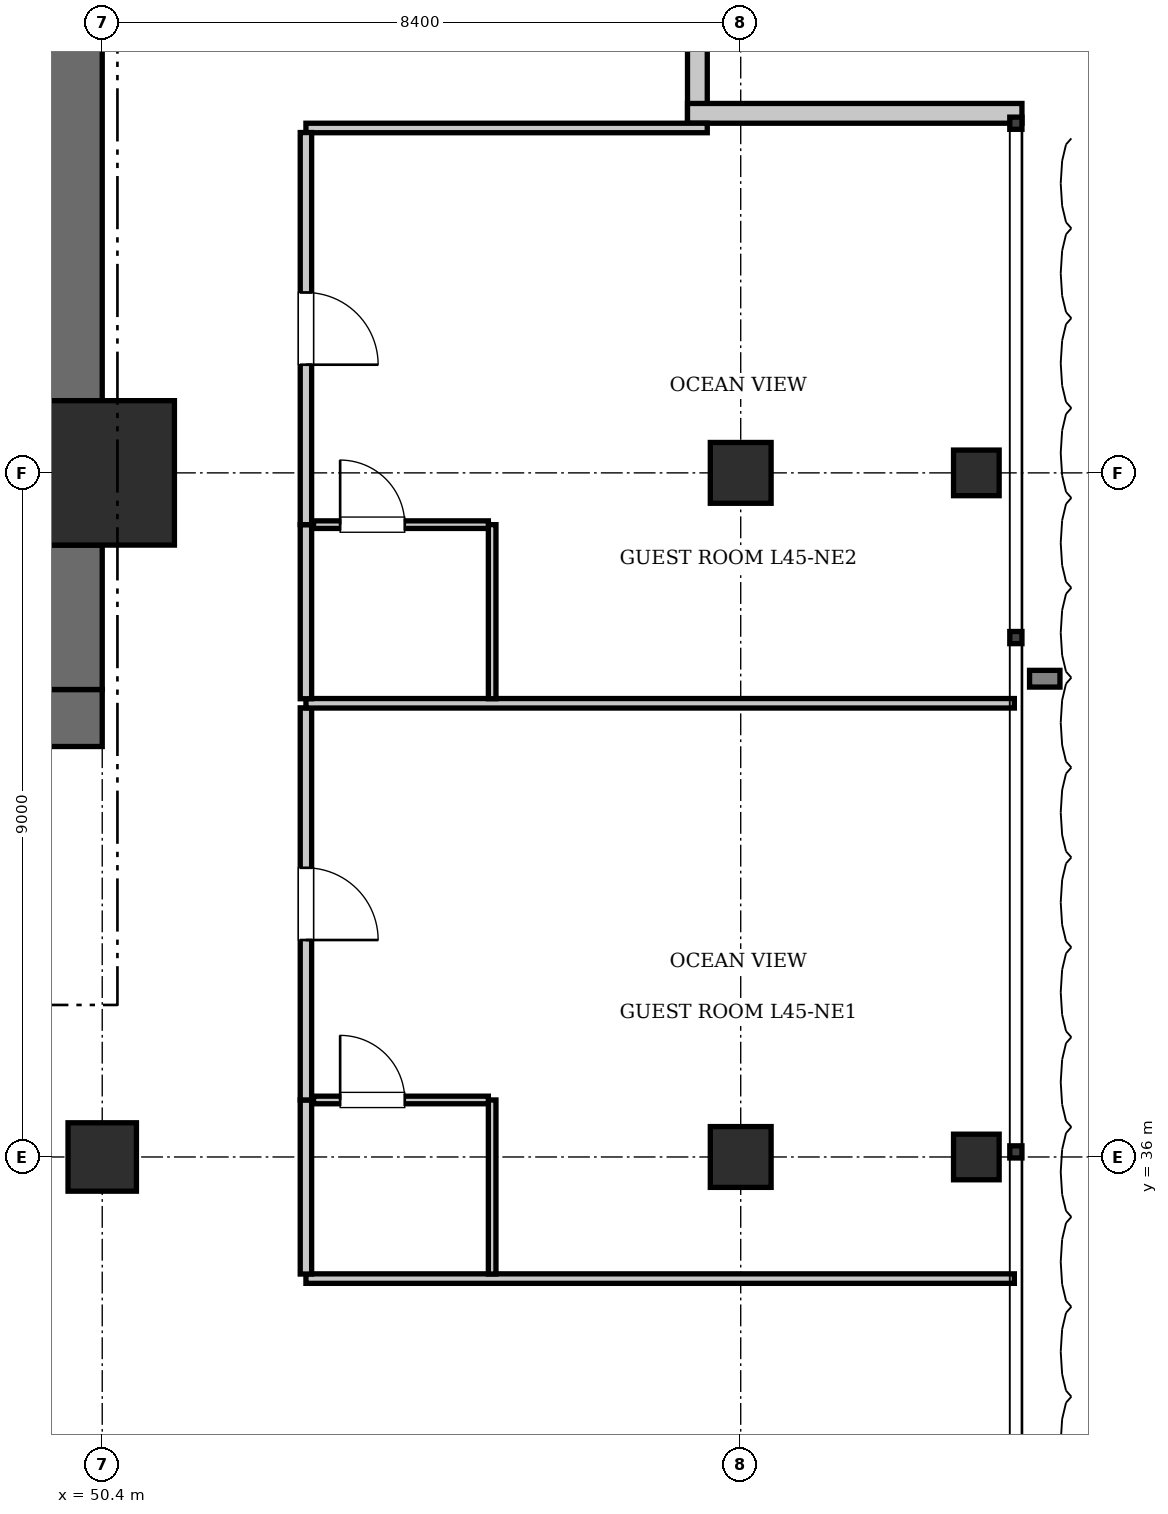
"""IFC4 building model, lengths in metres.
Left out: names, types, materials, properties, quantities, classifications, styles, units other than length and angle.
Written with IfcOpenShell. Run it as: python <this file> out.ifc"""

import sys

from ifc_helpers import new_model, si_unit, direction, frame, frame_2d, origin, origin_2d, place, context, subcontext, project, spatial, rectangle, i_section, extrude, element, fill, save


model = new_model("IFC4")
c1 = context("Model", 3, precision=1e-05, world=origin(), true_north=direction((0.0, 1.0)))
c2 = subcontext(c1, "Body", "Model", "MODEL_VIEW")
j1 = project(units=[si_unit("LENGTHUNIT", "METRE"), si_unit("PLANEANGLEUNIT", "RADIAN")], contexts=[c1])
p1 = place(None, origin())
s1 = spatial("IfcSite", under=j1, at=p1, CompositionType="ELEMENT")
p2 = place(p1, origin())
s2 = spatial("IfcBuilding", under=s1, at=p2, CompositionType="ELEMENT")
p3 = place(p2, frame((0.0, 0.0, 185.15)))
s3 = spatial("IfcBuildingStorey", under=s2, at=p3, CompositionType="ELEMENT", Elevation=185.15)
p4 = place(p3, frame((50.4, 45.0, 0.0), z_axis=(0.0, 0.0, 1.0), x_axis=(1.0, 0.0, 0.0)))
e1 = element("IfcColumn", 1, at=p4, inside=s3, PredefinedType="COLUMN", context=c2, shape_type="SweptSolid", body=[
    extrude(rectangle(XDim=1.9, YDim=1.9, at=origin_2d()), origin(), (0.0, 0.0, 1.0), 3.85),
])
p5 = place(p3, frame((43.6, 41.775, 0.0), z_axis=(0.0, 0.0, 1.0), x_axis=(1.0, 0.0, 0.0)))
e2 = element("IfcWall", 2, at=p5, inside=s3, PredefinedType="SHEAR", context=c2, shape_type="SweptSolid", body=[
    extrude(rectangle(XDim=6.8, YDim=0.75, at=frame_2d((3.4, 0.0))), origin(), (0.0, 0.0, 1.0), 3.85),
])
p6 = place(p5, frame((3.9, 0.0, 0.0)))
e3 = element("IfcOpeningElement", 3, at=p6, cuts=e2, PredefinedType="OPENING", context=c2, shape_type="SweptSolid", body=[
    extrude(rectangle(XDim=1.15, YDim=2.15, at=frame_2d((0.575, 1.075))), frame((0.0, 0.385, 0.0), z_axis=(0.0, -1.0, 0.0), x_axis=(1.0, 0.0, 0.0)), (0.0, 0.0, 1.0), 0.77),
])
p7 = place(p5, frame((0.55, 0.0, 0.0)))
e4 = element("IfcOpeningElement", 4, at=p7, cuts=e2, PredefinedType="OPENING", context=c2, shape_type="SweptSolid", body=[
    extrude(rectangle(XDim=1.1, YDim=2.2, at=frame_2d((0.55, 1.1))), frame((0.0, 0.385, 0.0), z_axis=(0.0, -1.0, 0.0), x_axis=(1.0, 0.0, 0.0)), (0.0, 0.0, 1.0), 0.77),
])
p8 = place(p3, frame((50.025, 42.15, 0.0), z_axis=(0.0, 0.0, 1.0), x_axis=(0.0, 1.0, 0.0)))
e5 = element("IfcWall", 5, at=p8, inside=s3, PredefinedType="SHEAR", context=c2, shape_type="SweptSolid", body=[
    extrude(rectangle(XDim=1.9, YDim=0.75, at=frame_2d((0.95, 0.0))), origin(), (0.0, 0.0, 1.0), 3.85),
])
p9 = place(p3, frame((50.025, 45.95, 0.0), z_axis=(0.0, 0.0, 1.0), x_axis=(0.0, 1.0, 0.0)))
e6 = element("IfcWall", 6, at=p9, inside=s3, PredefinedType="SHEAR", context=c2, shape_type="SweptSolid", body=[
    extrude(rectangle(XDim=7.3, YDim=0.75, at=frame_2d((3.65, 0.0))), origin(), (0.0, 0.0, 1.0), 3.85),
])
p10 = place(p3, frame((50.4, 36.0, 0.0), z_axis=(0.0, 0.0, 1.0), x_axis=(1.0, 0.0, 0.0)))
e7 = element("IfcColumn", 7, at=p10, inside=s3, PredefinedType="COLUMN", context=c2, shape_type="SweptSolid", body=[
    extrude(rectangle(XDim=0.9, YDim=0.9, at=origin_2d()), origin(), (0.0, 0.0, 1.0), 3.85),
])
for number, where, z_axis, x_axis in (
    (8, (58.8, 36.0, 0.0), (0.0, 0.0, 1.0), (1.0, 0.0, 0.0)),
    (9, (58.8, 45.0, 0.0), (0.0, 0.0, 1.0), (1.0, 0.0, 0.0)),
):
    element("IfcColumn", number, at=place(p3, frame(where, z_axis=z_axis, x_axis=x_axis)), inside=s3, PredefinedType="COLUMN", context=c2, shape_type="SweptSolid", body=[
        extrude(rectangle(XDim=0.8, YDim=0.8, at=origin_2d()), origin(), (0.0, 0.0, 1.0), 3.85),
    ])
for number, where, z_axis, x_axis in (
    (10, (61.9, 36.0, 0.0), (0.0, 0.0, 1.0), (1.0, 0.0, 0.0)),
    (11, (61.9, 45.0, 0.0), (0.0, 0.0, 1.0), (1.0, 0.0, 0.0)),
):
    element("IfcColumn", number, at=place(p3, frame(where, z_axis=z_axis, x_axis=x_axis)), inside=s3, PredefinedType="COLUMN", context=c2, shape_type="SweptSolid", body=[
        extrude(i_section(OverallWidth=0.6, OverallDepth=0.6, WebThickness=0.025, FlangeThickness=0.038, at=origin_2d()), origin(), (0.0, 0.0, 1.0), 3.85),
    ])
for number, where, z_axis, x_axis in (
    (12, (58.23, 54.0, 0.0), (0.0, 0.0, 1.0), (0.0, -1.0, 0.0)),
    (13, (58.1, 49.73, 0.0), (0.0, 0.0, 1.0), (1.0, 0.0, 0.0)),
):
    element("IfcWall", number, at=place(p3, frame(where, z_axis=z_axis, x_axis=x_axis)), inside=s3, PredefinedType="SOLIDWALL", context=c2, shape_type="SweptSolid", body=[
        extrude(rectangle(XDim=4.4, YDim=0.26, at=frame_2d((2.2, 0.0))), origin(), (0.0, 0.0, 1.0), 3.61),
    ])
p11 = place(p3, frame((53.08, 34.4, 0.0), z_axis=(0.0, 0.0, 1.0), x_axis=(1.0, 0.0, 0.0)))
e14 = element("IfcWall", 14, at=p11, inside=s3, PredefinedType="PARTITIONING", context=c2, shape_type="SweptSolid", body=[
    extrude(rectangle(XDim=9.32, YDim=0.125, at=frame_2d((4.66, 0.0))), origin(), (0.0, 0.0, 1.0), 3.61),
])
p12 = place(p3, frame((53.08, 49.538, 0.0), z_axis=(0.0, 0.0, 1.0), x_axis=(1.0, 0.0, 0.0)))
e15 = element("IfcWall", 15, at=p12, inside=s3, PredefinedType="PARTITIONING", context=c2, shape_type="SweptSolid", body=[
    extrude(rectangle(XDim=5.28, YDim=0.125, at=frame_2d((2.64, 0.0))), origin(), (0.0, 0.0, 1.0), 3.61),
])
p13 = place(p3, frame((53.08, 34.46, 0.0), z_axis=(0.0, 0.0, 1.0), x_axis=(0.0, 1.0, 0.0)))
e16 = element("IfcWall", 16, at=p13, inside=s3, PredefinedType="PARTITIONING", context=c2, shape_type="SweptSolid", body=[
    extrude(rectangle(XDim=2.29, YDim=0.15, at=frame_2d((1.145, 0.0))), origin(), (0.0, 0.0, 1.0), 3.61),
])
p14 = place(p3, frame((53.08, 36.75, 0.0), z_axis=(0.0, 0.0, 1.0), x_axis=(0.0, 1.0, 0.0)))
e17 = element("IfcWall", 17, at=p14, inside=s3, PredefinedType="PARTITIONING", context=c2, shape_type="SweptSolid", body=[
    extrude(rectangle(XDim=5.159, YDim=0.15, at=frame_2d((2.579, 0.0))), origin(), (0.0, 0.0, 1.0), 3.61),
])
p15 = place(p14, frame((2.104, 0.0, 0.0)))
e18 = element("IfcOpeningElement", 18, at=p15, cuts=e17, PredefinedType="OPENING", context=c2, shape_type="SweptSolid", body=[
    extrude(rectangle(XDim=0.95, YDim=2.15, at=frame_2d((0.475, 1.075))), frame((0.0, 0.085, 0.0), z_axis=(0.0, -1.0, 0.0), x_axis=(1.0, 0.0, 0.0)), (0.0, 0.0, 1.0), 0.17),
])
p16 = place(p3, frame((55.53, 34.46, 0.0), z_axis=(0.0, 0.0, 1.0), x_axis=(0.0, 1.0, 0.0)))
e19 = element("IfcWall", 19, at=p16, inside=s3, PredefinedType="PARTITIONING", context=c2, shape_type="SweptSolid", body=[
    extrude(rectangle(XDim=2.29, YDim=0.1, at=frame_2d((1.145, 0.0))), origin(), (0.0, 0.0, 1.0), 3.61),
])
p17 = place(p3, frame((53.18, 36.75, 0.0), z_axis=(0.0, 0.0, 1.0), x_axis=(1.0, 0.0, 0.0)))
e20 = element("IfcWall", 20, at=p17, inside=s3, PredefinedType="PARTITIONING", context=c2, shape_type="SweptSolid", body=[
    extrude(rectangle(XDim=2.3, YDim=0.1, at=frame_2d((1.15, 0.0))), origin(), (0.0, 0.0, 1.0), 3.61),
])
p18 = place(p17, frame((0.35, 0.0, 0.0)))
e21 = element("IfcOpeningElement", 21, at=p18, cuts=e20, PredefinedType="OPENING", context=c2, shape_type="SweptSolid", body=[
    extrude(rectangle(XDim=0.85, YDim=2.1, at=frame_2d((0.425, 1.05))), frame((0.0, 0.06, 0.0), z_axis=(0.0, -1.0, 0.0), x_axis=(1.0, 0.0, 0.0)), (0.0, 0.0, 1.0), 0.12),
])
p19 = place(p3, frame((53.08, 41.969, 0.0), z_axis=(0.0, 0.0, 1.0), x_axis=(1.0, 0.0, 0.0)))
e22 = element("IfcWall", 22, at=p19, inside=s3, PredefinedType="PARTITIONING", context=c2, shape_type="SweptSolid", body=[
    extrude(rectangle(XDim=9.32, YDim=0.125, at=frame_2d((4.66, 0.0))), origin(), (0.0, 0.0, 1.0), 3.61),
])
p20 = place(p3, frame((53.08, 42.029, 0.0), z_axis=(0.0, 0.0, 1.0), x_axis=(0.0, 1.0, 0.0)))
e23 = element("IfcWall", 23, at=p20, inside=s3, PredefinedType="PARTITIONING", context=c2, shape_type="SweptSolid", body=[
    extrude(rectangle(XDim=2.29, YDim=0.15, at=frame_2d((1.145, 0.0))), origin(), (0.0, 0.0, 1.0), 3.61),
])
p21 = place(p3, frame((53.08, 44.319, 0.0), z_axis=(0.0, 0.0, 1.0), x_axis=(0.0, 1.0, 0.0)))
e24 = element("IfcWall", 24, at=p21, inside=s3, PredefinedType="PARTITIONING", context=c2, shape_type="SweptSolid", body=[
    extrude(rectangle(XDim=5.159, YDim=0.15, at=frame_2d((2.579, 0.0))), origin(), (0.0, 0.0, 1.0), 3.61),
])
p22 = place(p21, frame((2.104, 0.0, 0.0)))
e25 = element("IfcOpeningElement", 25, at=p22, cuts=e24, PredefinedType="OPENING", context=c2, shape_type="SweptSolid", body=[
    extrude(rectangle(XDim=0.95, YDim=2.15, at=frame_2d((0.475, 1.075))), frame((0.0, 0.085, 0.0), z_axis=(0.0, -1.0, 0.0), x_axis=(1.0, 0.0, 0.0)), (0.0, 0.0, 1.0), 0.17),
])
p23 = place(p3, frame((55.53, 42.029, 0.0), z_axis=(0.0, 0.0, 1.0), x_axis=(0.0, 1.0, 0.0)))
e26 = element("IfcWall", 26, at=p23, inside=s3, PredefinedType="PARTITIONING", context=c2, shape_type="SweptSolid", body=[
    extrude(rectangle(XDim=2.29, YDim=0.1, at=frame_2d((1.145, 0.0))), origin(), (0.0, 0.0, 1.0), 3.61),
])
p24 = place(p3, frame((53.18, 44.319, 0.0), z_axis=(0.0, 0.0, 1.0), x_axis=(1.0, 0.0, 0.0)))
e27 = element("IfcWall", 27, at=p24, inside=s3, PredefinedType="PARTITIONING", context=c2, shape_type="SweptSolid", body=[
    extrude(rectangle(XDim=2.3, YDim=0.1, at=frame_2d((1.15, 0.0))), origin(), (0.0, 0.0, 1.0), 3.61),
])
p25 = place(p24, frame((0.35, 0.0, 0.0)))
e28 = element("IfcOpeningElement", 28, at=p25, cuts=e27, PredefinedType="OPENING", context=c2, shape_type="SweptSolid", body=[
    extrude(rectangle(XDim=0.85, YDim=2.1, at=frame_2d((0.425, 1.05))), frame((0.0, 0.06, 0.0), z_axis=(0.0, -1.0, 0.0), x_axis=(1.0, 0.0, 0.0)), (0.0, 0.0, 1.0), 0.12),
])
p26 = place(p18, origin())
e29 = element("IfcDoor", 29, at=p26, inside=s3, OperationType="SINGLE_SWING_LEFT", PredefinedType="DOOR", context=c2, shape_type="SweptSolid", body=[
    extrude(rectangle(XDim=0.85, YDim=2.1, at=frame_2d((0.425, 1.05))), frame((0.0, 0.025, 0.0), z_axis=(0.0, -1.0, 0.0), x_axis=(1.0, 0.0, 0.0)), (0.0, 0.0, 1.0), 0.05),
])
fill(e21, e29)
p27 = place(p15, frame((0.95, 0.0, 0.0), z_axis=(0.0, 0.0, 1.0), x_axis=(-1.0, 0.0, 0.0)))
e30 = element("IfcDoor", 30, at=p27, inside=s3, OperationType="SINGLE_SWING_RIGHT", PredefinedType="DOOR", context=c2, shape_type="SweptSolid", body=[
    extrude(rectangle(XDim=0.95, YDim=2.15, at=frame_2d((0.475, 1.075))), frame((0.0, 0.025, 0.0), z_axis=(0.0, -1.0, 0.0), x_axis=(1.0, 0.0, 0.0)), (0.0, 0.0, 1.0), 0.05),
])
fill(e18, e30)
p28 = place(p25, origin())
e31 = element("IfcDoor", 31, at=p28, inside=s3, OperationType="SINGLE_SWING_LEFT", PredefinedType="DOOR", context=c2, shape_type="SweptSolid", body=[
    extrude(rectangle(XDim=0.85, YDim=2.1, at=frame_2d((0.425, 1.05))), frame((0.0, 0.025, 0.0), z_axis=(0.0, -1.0, 0.0), x_axis=(1.0, 0.0, 0.0)), (0.0, 0.0, 1.0), 0.05),
])
fill(e28, e31)
p29 = place(p22, frame((0.95, 0.0, 0.0), z_axis=(0.0, 0.0, 1.0), x_axis=(-1.0, 0.0, 0.0)))
e32 = element("IfcDoor", 32, at=p29, inside=s3, OperationType="SINGLE_SWING_RIGHT", PredefinedType="DOOR", context=c2, shape_type="SweptSolid", body=[
    extrude(rectangle(XDim=0.95, YDim=2.15, at=frame_2d((0.475, 1.075))), frame((0.0, 0.025, 0.0), z_axis=(0.0, -1.0, 0.0), x_axis=(1.0, 0.0, 0.0)), (0.0, 0.0, 1.0), 0.05),
])
fill(e25, e32)
save(model, sys.argv[1])
